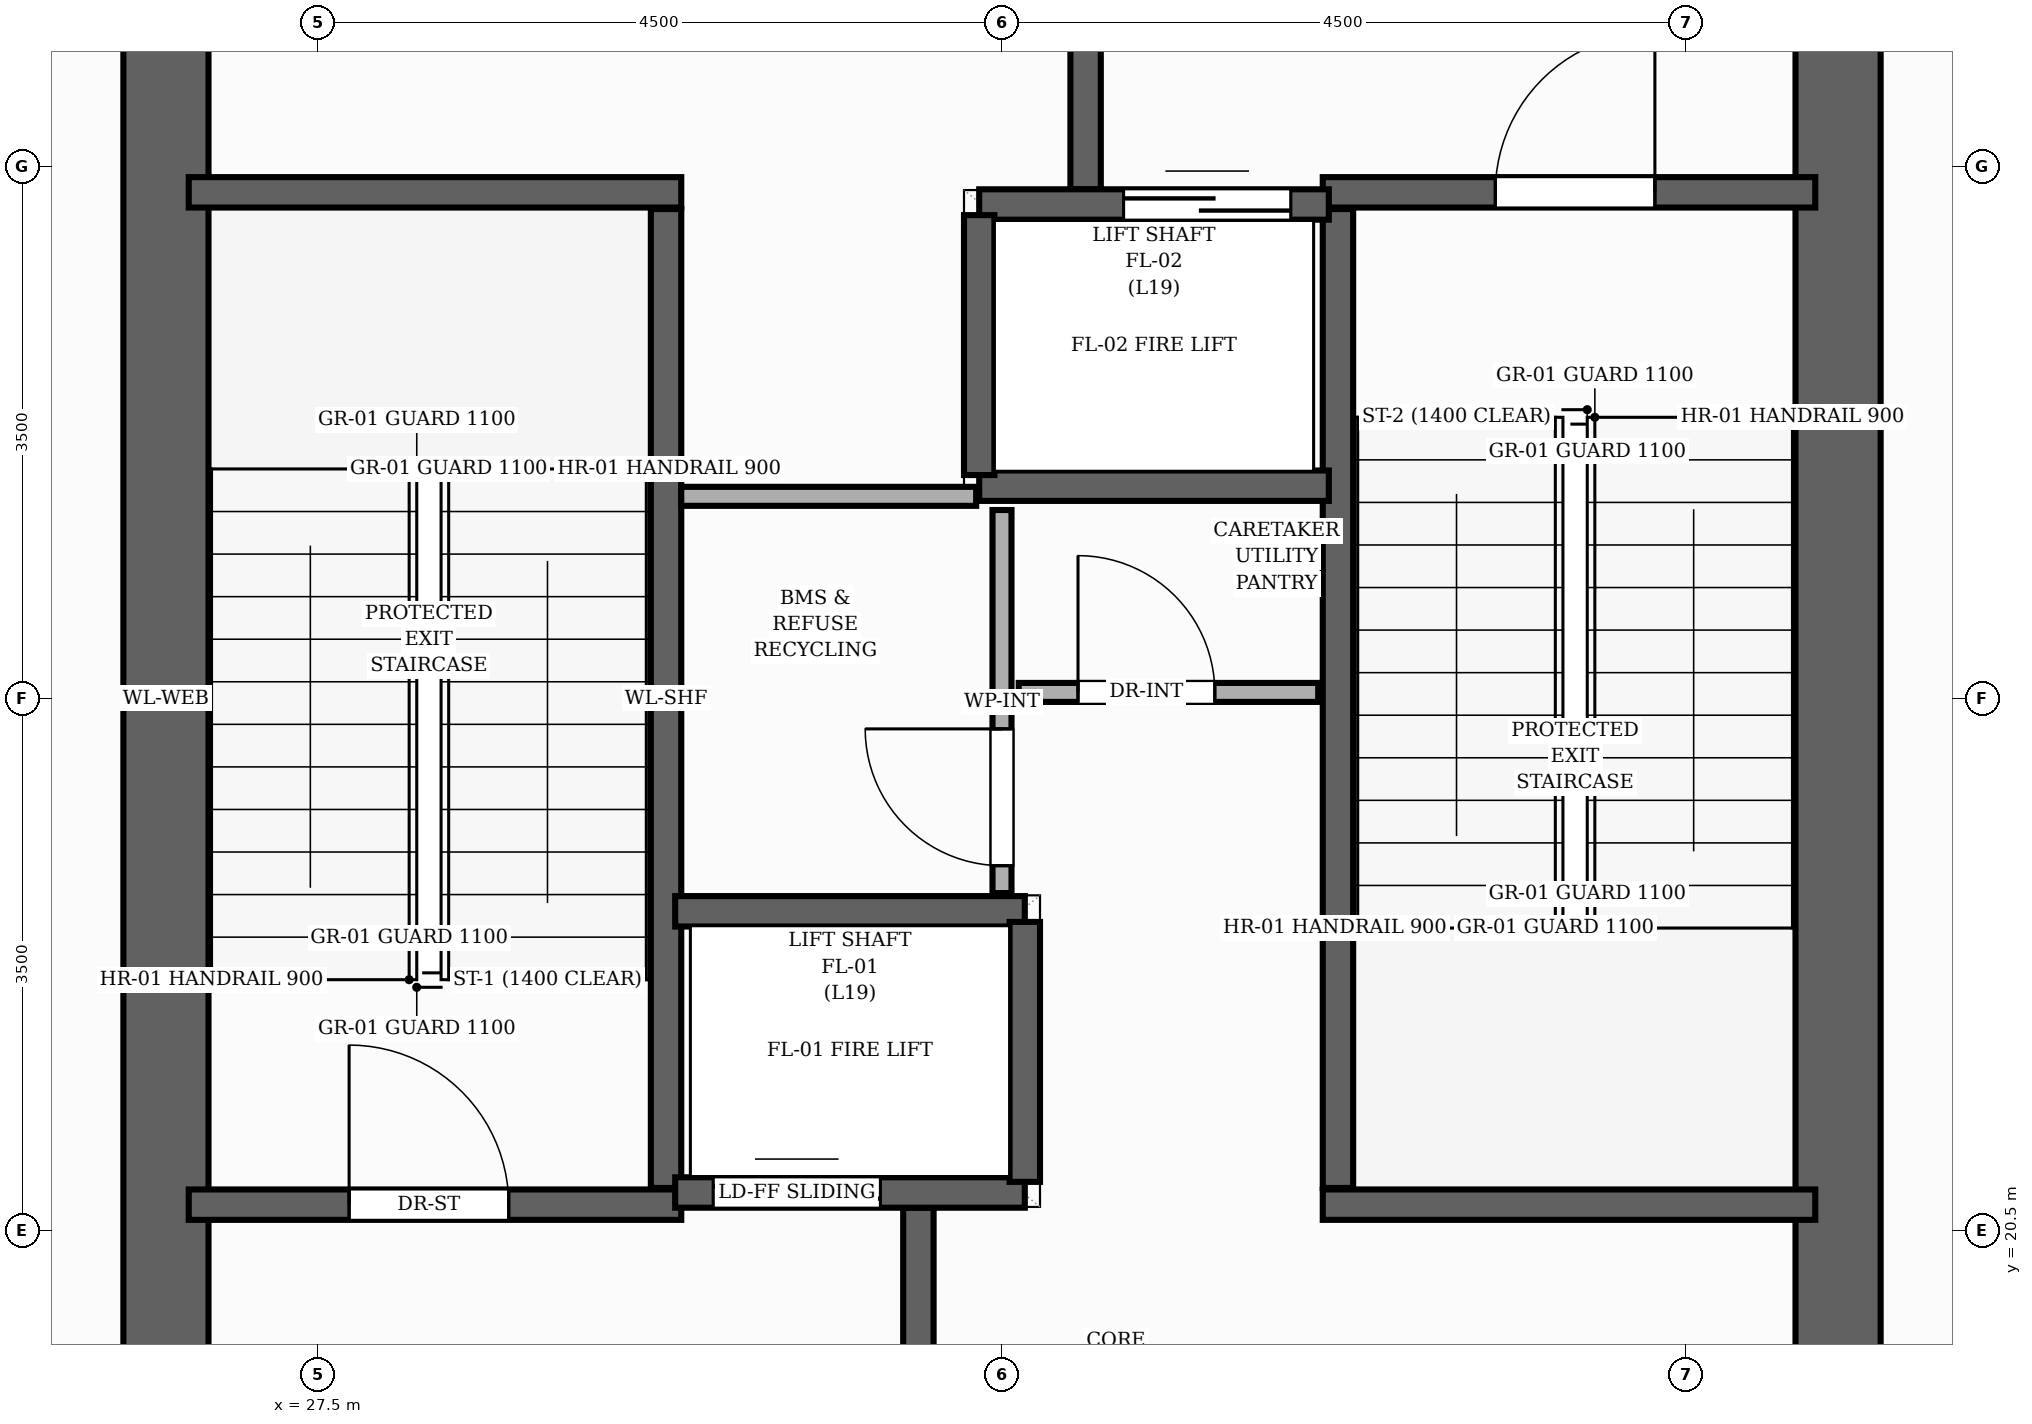
"""IFC4 building model, lengths in metres.
Left out: names, types, materials, properties, quantities, classifications, styles, units other than length and angle.
Written with IfcOpenShell. Run it as: python <this file> out.ifc"""

import sys

from ifc_helpers import new_model, si_unit, direction, frame, frame_2d, origin, place, context, subcontext, project, spatial, rectangle, extrude, element, fill, save


model = new_model("IFC4")
c1 = context("Model", 3, precision=1e-05, world=origin(), true_north=direction((0.0, 1.0)))
c2 = subcontext(c1, "Body", "Model", "MODEL_VIEW")
j1 = project(units=[si_unit("LENGTHUNIT", "METRE"), si_unit("PLANEANGLEUNIT", "RADIAN")], contexts=[c1])
p1 = place(None, origin())
s1 = spatial("IfcSite", under=j1, at=p1, CompositionType="ELEMENT")
p2 = place(p1, origin())
s2 = spatial("IfcBuilding", under=s1, at=p2, CompositionType="ELEMENT")
p3 = place(p2, frame((0.0, 0.0, 66.4)))
s3 = spatial("IfcBuildingStorey", under=s2, at=p3, CompositionType="ELEMENT", Elevation=66.4)
for number, where, z_axis, x_axis in (
    (1, (26.5, 17.4, 0.0), (0.0, 0.0, 1.0), (0.0, 1.0, 0.0)),
    (2, (37.5, 17.4, 0.0), (0.0, 0.0, 1.0), (0.0, 1.0, 0.0)),
):
    element("IfcWall", number, at=place(p3, frame(where, z_axis=z_axis, x_axis=x_axis)), inside=s3, PredefinedType="SHEAR", context=c2, shape_type="SweptSolid", body=[
        extrude(rectangle(XDim=13.2, YDim=0.56, at=frame_2d((6.6, 0.0))), origin(), (0.0, 0.0, 1.0), 4.48),
    ])
p4 = place(p3, frame((29.79, 20.78, 0.0), z_axis=(0.0, 0.0, 1.0), x_axis=(0.0, 1.0, 0.0)))
e3 = element("IfcWall", 3, at=p4, inside=s3, PredefinedType="SHEAR", context=c2, shape_type="SweptSolid", body=[
    extrude(rectangle(XDim=6.44, YDim=0.2, at=frame_2d((3.22, 0.0))), origin(), (0.0, 0.0, 1.0), 4.48),
])
p5 = place(p3, frame((26.65, 27.33, 0.0), z_axis=(0.0, 0.0, 1.0), x_axis=(1.0, 0.0, 0.0)))
e4 = element("IfcWall", 4, at=p5, inside=s3, PredefinedType="SHEAR", context=c2, shape_type="SweptSolid", body=[
    extrude(rectangle(XDim=3.24, YDim=0.2, at=frame_2d((1.62, 0.0))), origin(), (0.0, 0.0, 1.0), 4.48),
])
p6 = place(p3, frame((26.65, 20.67, 0.0), z_axis=(0.0, 0.0, 1.0), x_axis=(1.0, 0.0, 0.0)))
e5 = element("IfcWall", 5, at=p6, inside=s3, PredefinedType="SHEAR", context=c2, shape_type="SweptSolid", body=[
    extrude(rectangle(XDim=3.24, YDim=0.2, at=frame_2d((1.62, 0.0))), origin(), (0.0, 0.0, 1.0), 4.48),
])
p7 = place(p6, frame((1.055, 0.0, 0.0)))
e6 = element("IfcOpeningElement", 6, at=p7, cuts=e5, PredefinedType="OPENING", context=c2, shape_type="SweptSolid", body=[
    extrude(rectangle(XDim=1.05, YDim=2.15, at=frame_2d((0.525, 1.075))), frame((0.0, 0.11, 0.0), z_axis=(0.0, -1.0, 0.0), x_axis=(1.0, 0.0, 0.0)), (0.0, 0.0, 1.0), 0.22),
])
p8 = place(p3, frame((34.21, 20.78, 0.0), z_axis=(0.0, 0.0, 1.0), x_axis=(0.0, 1.0, 0.0)))
e7 = element("IfcWall", 7, at=p8, inside=s3, PredefinedType="SHEAR", context=c2, shape_type="SweptSolid", body=[
    extrude(rectangle(XDim=6.44, YDim=0.2, at=frame_2d((3.22, 0.0))), origin(), (0.0, 0.0, 1.0), 4.48),
])
p9 = place(p3, frame((34.11, 20.67, 0.0), z_axis=(0.0, 0.0, 1.0), x_axis=(1.0, 0.0, 0.0)))
e8 = element("IfcWall", 8, at=p9, inside=s3, PredefinedType="SHEAR", context=c2, shape_type="SweptSolid", body=[
    extrude(rectangle(XDim=3.24, YDim=0.2, at=frame_2d((1.62, 0.0))), origin(), (0.0, 0.0, 1.0), 4.48),
])
p10 = place(p3, frame((34.11, 27.33, 0.0), z_axis=(0.0, 0.0, 1.0), x_axis=(1.0, 0.0, 0.0)))
e9 = element("IfcWall", 9, at=p10, inside=s3, PredefinedType="SHEAR", context=c2, shape_type="SweptSolid", body=[
    extrude(rectangle(XDim=3.24, YDim=0.2, at=frame_2d((1.62, 0.0))), origin(), (0.0, 0.0, 1.0), 4.48),
])
p11 = place(p10, frame((1.135, 0.0, 0.0)))
e10 = element("IfcOpeningElement", 10, at=p11, cuts=e9, PredefinedType="OPENING", context=c2, shape_type="SweptSolid", body=[
    extrude(rectangle(XDim=1.05, YDim=2.15, at=frame_2d((0.525, 1.075))), frame((0.0, 0.11, 0.0), z_axis=(0.0, -1.0, 0.0), x_axis=(1.0, 0.0, 0.0)), (0.0, 0.0, 1.0), 0.22),
])
for number, where, z_axis, x_axis in (
    (11, (31.45, 17.15, 0.0), (0.0, 0.0, 1.0), (0.0, 1.0, 0.0)),
    (12, (32.55, 27.35, 0.0), (0.0, 0.0, 1.0), (0.0, 1.0, 0.0)),
):
    element("IfcWall", number, at=place(p3, frame(where, z_axis=z_axis, x_axis=x_axis)), inside=s3, PredefinedType="SHEAR", context=c2, shape_type="SweptSolid", body=[
        extrude(rectangle(XDim=3.5, YDim=0.2, at=frame_2d((1.75, 0.0))), origin(), (0.0, 0.0, 1.0), 4.48),
    ])
p12 = place(p3, frame((29.85, 20.75, 0.0), z_axis=(0.0, 0.0, 1.0), x_axis=(1.0, 0.0, 0.0)))
e13 = element("IfcWall", 13, at=p12, inside=s3, PredefinedType="SHEAR", context=c2, shape_type="SweptSolid", body=[
    extrude(rectangle(XDim=2.3, YDim=0.2, at=frame_2d((1.15, 0.0))), origin(), (0.0, 0.0, 1.0), 4.48),
])
p13 = place(p12, frame((0.25, 0.0, 0.0)))
e14 = element("IfcOpeningElement", 14, at=p13, cuts=e13, PredefinedType="OPENING", context=c2, shape_type="SweptSolid", body=[
    extrude(rectangle(XDim=1.1, YDim=2.15, at=frame_2d((0.55, 1.075))), frame((0.0, 0.11, 0.0), z_axis=(0.0, -1.0, 0.0), x_axis=(1.0, 0.0, 0.0)), (0.0, 0.0, 1.0), 0.22),
])
p14 = place(p3, frame((29.85, 22.6, 0.0), z_axis=(0.0, 0.0, 1.0), x_axis=(1.0, 0.0, 0.0)))
e15 = element("IfcWall", 15, at=p14, inside=s3, PredefinedType="SHEAR", context=c2, shape_type="SweptSolid", body=[
    extrude(rectangle(XDim=2.3, YDim=0.2, at=frame_2d((1.15, 0.0))), origin(), (0.0, 0.0, 1.0), 4.48),
])
p15 = place(p3, frame((32.15, 20.82, 0.0), z_axis=(0.0, 0.0, 1.0), x_axis=(0.0, 1.0, 0.0)))
e16 = element("IfcWall", 16, at=p15, inside=s3, PredefinedType="SHEAR", context=c2, shape_type="SweptSolid", body=[
    extrude(rectangle(XDim=1.71, YDim=0.2, at=frame_2d((0.855, 0.0))), origin(), (0.0, 0.0, 1.0), 4.48),
])
p16 = place(p3, frame((31.85, 27.25, 0.0), z_axis=(0.0, 0.0, 1.0), x_axis=(1.0, 0.0, 0.0)))
e17 = element("IfcWall", 17, at=p16, inside=s3, PredefinedType="SHEAR", context=c2, shape_type="SweptSolid", body=[
    extrude(rectangle(XDim=2.3, YDim=0.2, at=frame_2d((1.15, 0.0))), origin(), (0.0, 0.0, 1.0), 4.48),
])
p17 = place(p16, frame((0.95, 0.0, 0.0)))
e18 = element("IfcOpeningElement", 18, at=p17, cuts=e17, PredefinedType="OPENING", context=c2, shape_type="SweptSolid", body=[
    extrude(rectangle(XDim=1.1, YDim=2.15, at=frame_2d((0.55, 1.075))), frame((0.0, 0.11, 0.0), z_axis=(0.0, -1.0, 0.0), x_axis=(1.0, 0.0, 0.0)), (0.0, 0.0, 1.0), 0.22),
])
p18 = place(p3, frame((31.85, 25.4, 0.0), z_axis=(0.0, 0.0, 1.0), x_axis=(1.0, 0.0, 0.0)))
e19 = element("IfcWall", 19, at=p18, inside=s3, PredefinedType="SHEAR", context=c2, shape_type="SweptSolid", body=[
    extrude(rectangle(XDim=2.3, YDim=0.2, at=frame_2d((1.15, 0.0))), origin(), (0.0, 0.0, 1.0), 4.48),
])
p19 = place(p3, frame((31.85, 25.47, 0.0), z_axis=(0.0, 0.0, 1.0), x_axis=(0.0, 1.0, 0.0)))
e20 = element("IfcWall", 20, at=p19, inside=s3, PredefinedType="SHEAR", context=c2, shape_type="SweptSolid", body=[
    extrude(rectangle(XDim=1.71, YDim=0.2, at=frame_2d((0.855, 0.0))), origin(), (0.0, 0.0, 1.0), 4.48),
])
p20 = place(p3, frame((32.0, 22.72, 0.0), z_axis=(0.0, 0.0, 1.0), x_axis=(0.0, 1.0, 0.0)))
e21 = element("IfcWall", 21, at=p20, inside=s3, PredefinedType="PARTITIONING", context=c2, shape_type="SweptSolid", body=[
    extrude(rectangle(XDim=2.52, YDim=0.125, at=frame_2d((1.26, 0.0))), origin(), (0.0, 0.0, 1.0), 4.235),
])
p21 = place(p20, frame((0.18, 0.0, 0.0)))
e22 = element("IfcOpeningElement", 22, at=p21, cuts=e21, PredefinedType="OPENING", context=c2, shape_type="SweptSolid", body=[
    extrude(rectangle(XDim=0.9, YDim=2.1, at=frame_2d((0.45, 1.05))), frame((0.0, 0.073, 0.0), z_axis=(0.0, -1.0, 0.0), x_axis=(1.0, 0.0, 0.0)), (0.0, 0.0, 1.0), 0.145),
])
p22 = place(p3, frame((32.11, 24.04, 0.0), z_axis=(0.0, 0.0, 1.0), x_axis=(1.0, 0.0, 0.0)))
e23 = element("IfcWall", 23, at=p22, inside=s3, PredefinedType="PARTITIONING", context=c2, shape_type="SweptSolid", body=[
    extrude(rectangle(XDim=1.97, YDim=0.125, at=frame_2d((0.985, 0.0))), origin(), (0.0, 0.0, 1.0), 4.235),
])
p23 = place(p22, frame((0.39, 0.0, 0.0)))
e24 = element("IfcOpeningElement", 24, at=p23, cuts=e23, PredefinedType="OPENING", context=c2, shape_type="SweptSolid", body=[
    extrude(rectangle(XDim=0.9, YDim=2.1, at=frame_2d((0.45, 1.05))), frame((0.0, 0.073, 0.0), z_axis=(0.0, -1.0, 0.0), x_axis=(1.0, 0.0, 0.0)), (0.0, 0.0, 1.0), 0.145),
])
p24 = place(p3, frame((29.89, 25.33, 0.0), z_axis=(0.0, 0.0, 1.0), x_axis=(1.0, 0.0, 0.0)))
e25 = element("IfcWall", 25, at=p24, inside=s3, PredefinedType="PARTITIONING", context=c2, shape_type="SweptSolid", body=[
    extrude(rectangle(XDim=1.94, YDim=0.125, at=frame_2d((0.97, 0.0))), origin(), (0.0, 0.0, 1.0), 4.235),
])
p25 = place(p7, origin())
e26 = element("IfcDoor", 26, at=p25, inside=s3, OperationType="SINGLE_SWING_LEFT", PredefinedType="DOOR", context=c2, shape_type="SweptSolid", body=[
    extrude(rectangle(XDim=1.05, YDim=2.15, at=frame_2d((0.525, 1.075))), frame((0.0, 0.025, 0.0), z_axis=(0.0, -1.0, 0.0), x_axis=(1.0, 0.0, 0.0)), (0.0, 0.0, 1.0), 0.05),
])
fill(e6, e26)
p26 = place(p11, origin())
e27 = element("IfcDoor", 27, at=p26, inside=s3, OperationType="SINGLE_SWING_RIGHT", PredefinedType="DOOR", context=c2, shape_type="SweptSolid", body=[
    extrude(rectangle(XDim=1.05, YDim=2.15, at=frame_2d((0.525, 1.075))), frame((0.0, 0.025, 0.0), z_axis=(0.0, -1.0, 0.0), x_axis=(1.0, 0.0, 0.0)), (0.0, 0.0, 1.0), 0.05),
])
fill(e10, e27)
p27 = place(p13, origin())
e28 = element("IfcDoor", 28, at=p27, inside=s3, OperationType="DOUBLE_DOOR_SLIDING", PredefinedType="DOOR", context=c2, shape_type="SweptSolid", body=[
    extrude(rectangle(XDim=1.1, YDim=2.15, at=frame_2d((0.55, 1.075))), frame((0.0, 0.025, 0.0), z_axis=(0.0, -1.0, 0.0), x_axis=(1.0, 0.0, 0.0)), (0.0, 0.0, 1.0), 0.05),
])
fill(e14, e28)
p28 = place(p17, origin())
e29 = element("IfcDoor", 29, at=p28, inside=s3, OperationType="DOUBLE_DOOR_SLIDING", PredefinedType="DOOR", context=c2, shape_type="SweptSolid", body=[
    extrude(rectangle(XDim=1.1, YDim=2.15, at=frame_2d((0.55, 1.075))), frame((0.0, 0.025, 0.0), z_axis=(0.0, -1.0, 0.0), x_axis=(1.0, 0.0, 0.0)), (0.0, 0.0, 1.0), 0.05),
])
fill(e18, e29)
p29 = place(p23, origin())
e30 = element("IfcDoor", 30, at=p29, inside=s3, OperationType="SINGLE_SWING_LEFT", PredefinedType="DOOR", context=c2, shape_type="SweptSolid", body=[
    extrude(rectangle(XDim=0.9, YDim=2.1, at=frame_2d((0.45, 1.05))), frame((0.0, 0.025, 0.0), z_axis=(0.0, -1.0, 0.0), x_axis=(1.0, 0.0, 0.0)), (0.0, 0.0, 1.0), 0.05),
])
fill(e24, e30)
p30 = place(p21, origin())
e31 = element("IfcDoor", 31, at=p30, inside=s3, OperationType="SINGLE_SWING_RIGHT", PredefinedType="DOOR", context=c2, shape_type="SweptSolid", body=[
    extrude(rectangle(XDim=0.9, YDim=2.1, at=frame_2d((0.45, 1.05))), frame((0.0, 0.025, 0.0), z_axis=(0.0, -1.0, 0.0), x_axis=(1.0, 0.0, 0.0)), (0.0, 0.0, 1.0), 0.05),
])
fill(e22, e31)
save(model, sys.argv[1])
